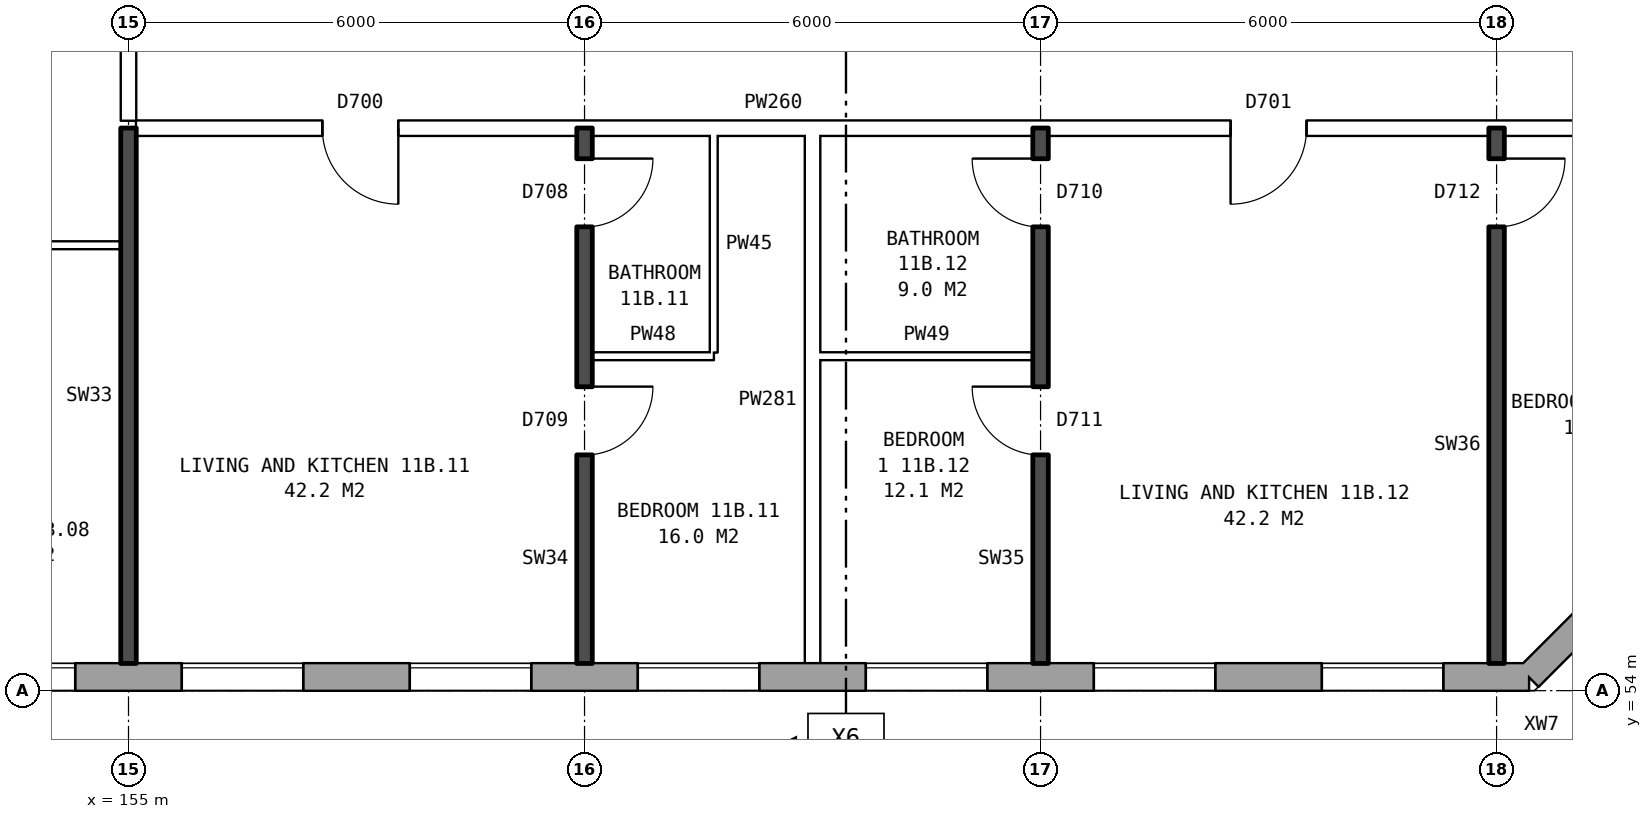
"""IFC4 building model, lengths in metres.
Left out: names, types, materials, properties, quantities, classifications, styles, units other than length and angle.
Written with IfcOpenShell. Run it as: python <this file> out.ifc"""

import sys

from ifc_helpers import new_model, si_unit, direction, frame, frame_2d, origin, place, context, subcontext, project, spatial, rectangle, extrude, element, fill, save


model = new_model("IFC4")
c1 = context("Model", 3, precision=1e-05, world=origin(), true_north=direction((0.0, 1.0)))
c2 = subcontext(c1, "Body", "Model", "MODEL_VIEW")
j1 = project(units=[si_unit("LENGTHUNIT", "METRE"), si_unit("PLANEANGLEUNIT", "RADIAN")], contexts=[c1])
p1 = place(None, origin())
s1 = spatial("IfcSite", under=j1, at=p1, CompositionType="ELEMENT")
p2 = place(p1, origin())
s2 = spatial("IfcBuilding", under=s1, at=p2, CompositionType="ELEMENT")
p3 = place(p2, frame((0.0, 0.0, 44.3)))
s3 = spatial("IfcBuildingStorey", under=s2, at=p3, CompositionType="ELEMENT", Elevation=44.3)
p4 = place(p3, frame((134.075, 54.18, 0.0), z_axis=(0.0, 0.0, 1.0), x_axis=(1.0, 0.0, 0.0)))
e1 = element("IfcWall", 1, at=p4, inside=s3, PredefinedType="STANDARD", context=c2, shape_type="SweptSolid", body=[
    extrude(rectangle(XDim=39.351, YDim=0.36, at=frame_2d((19.675, 0.0))), origin(), (0.0, 0.0, 1.0), 2.85),
])
p5 = place(p4, frame((0.3, 0.0, 0.8)))
e2 = element("IfcOpeningElement", 2, at=p5, cuts=e1, PredefinedType="OPENING", context=c2, shape_type="SweptSolid", body=[
    extrude(rectangle(XDim=0.6, YDim=0.9, at=frame_2d((0.3, 0.45))), frame((0.0, 0.19, 0.0), z_axis=(0.0, -1.0, 0.0), x_axis=(1.0, 0.0, 0.0)), (0.0, 0.0, 1.0), 0.38),
])
p6 = place(p4, frame((3.625, 0.0, 0.8)))
e3 = element("IfcOpeningElement", 3, at=p6, cuts=e1, PredefinedType="OPENING", context=c2, shape_type="SweptSolid", body=[
    extrude(rectangle(XDim=1.6, YDim=1.8, at=frame_2d((0.8, 0.9))), frame((0.0, 0.19, 0.0), z_axis=(0.0, -1.0, 0.0), x_axis=(1.0, 0.0, 0.0)), (0.0, 0.0, 1.0), 0.38),
])
p7 = place(p4, frame((6.625, 0.0, 0.8)))
e4 = element("IfcOpeningElement", 4, at=p7, cuts=e1, PredefinedType="OPENING", context=c2, shape_type="SweptSolid", body=[
    extrude(rectangle(XDim=1.6, YDim=1.8, at=frame_2d((0.8, 0.9))), frame((0.0, 0.19, 0.0), z_axis=(0.0, -1.0, 0.0), x_axis=(1.0, 0.0, 0.0)), (0.0, 0.0, 1.0), 0.38),
])
p8 = place(p4, frame((9.625, 0.0, 0.8)))
e5 = element("IfcOpeningElement", 5, at=p8, cuts=e1, PredefinedType="OPENING", context=c2, shape_type="SweptSolid", body=[
    extrude(rectangle(XDim=1.6, YDim=1.8, at=frame_2d((0.8, 0.9))), frame((0.0, 0.19, 0.0), z_axis=(0.0, -1.0, 0.0), x_axis=(1.0, 0.0, 0.0)), (0.0, 0.0, 1.0), 0.38),
])
p9 = place(p4, frame((12.625, 0.0, 0.8)))
e6 = element("IfcOpeningElement", 6, at=p9, cuts=e1, PredefinedType="OPENING", context=c2, shape_type="SweptSolid", body=[
    extrude(rectangle(XDim=1.6, YDim=1.8, at=frame_2d((0.8, 0.9))), frame((0.0, 0.19, 0.0), z_axis=(0.0, -1.0, 0.0), x_axis=(1.0, 0.0, 0.0)), (0.0, 0.0, 1.0), 0.38),
])
p10 = place(p4, frame((15.625, 0.0, 0.8)))
e7 = element("IfcOpeningElement", 7, at=p10, cuts=e1, PredefinedType="OPENING", context=c2, shape_type="SweptSolid", body=[
    extrude(rectangle(XDim=1.6, YDim=1.8, at=frame_2d((0.8, 0.9))), frame((0.0, 0.19, 0.0), z_axis=(0.0, -1.0, 0.0), x_axis=(1.0, 0.0, 0.0)), (0.0, 0.0, 1.0), 0.38),
])
p11 = place(p4, frame((18.625, 0.0, 0.8)))
e8 = element("IfcOpeningElement", 8, at=p11, cuts=e1, PredefinedType="OPENING", context=c2, shape_type="SweptSolid", body=[
    extrude(rectangle(XDim=1.6, YDim=1.8, at=frame_2d((0.8, 0.9))), frame((0.0, 0.19, 0.0), z_axis=(0.0, -1.0, 0.0), x_axis=(1.0, 0.0, 0.0)), (0.0, 0.0, 1.0), 0.38),
])
p12 = place(p4, frame((21.625, 0.0, 0.8)))
e9 = element("IfcOpeningElement", 9, at=p12, cuts=e1, PredefinedType="OPENING", context=c2, shape_type="SweptSolid", body=[
    extrude(rectangle(XDim=1.6, YDim=1.8, at=frame_2d((0.8, 0.9))), frame((0.0, 0.19, 0.0), z_axis=(0.0, -1.0, 0.0), x_axis=(1.0, 0.0, 0.0)), (0.0, 0.0, 1.0), 0.38),
])
p13 = place(p4, frame((24.625, 0.0, 0.8)))
e10 = element("IfcOpeningElement", 10, at=p13, cuts=e1, PredefinedType="OPENING", context=c2, shape_type="SweptSolid", body=[
    extrude(rectangle(XDim=1.6, YDim=1.8, at=frame_2d((0.8, 0.9))), frame((0.0, 0.19, 0.0), z_axis=(0.0, -1.0, 0.0), x_axis=(1.0, 0.0, 0.0)), (0.0, 0.0, 1.0), 0.38),
])
p14 = place(p4, frame((27.625, 0.0, 0.8)))
e11 = element("IfcOpeningElement", 11, at=p14, cuts=e1, PredefinedType="OPENING", context=c2, shape_type="SweptSolid", body=[
    extrude(rectangle(XDim=1.6, YDim=1.8, at=frame_2d((0.8, 0.9))), frame((0.0, 0.19, 0.0), z_axis=(0.0, -1.0, 0.0), x_axis=(1.0, 0.0, 0.0)), (0.0, 0.0, 1.0), 0.38),
])
p15 = place(p4, frame((30.625, 0.0, 0.8)))
e12 = element("IfcOpeningElement", 12, at=p15, cuts=e1, PredefinedType="OPENING", context=c2, shape_type="SweptSolid", body=[
    extrude(rectangle(XDim=1.6, YDim=1.8, at=frame_2d((0.8, 0.9))), frame((0.0, 0.19, 0.0), z_axis=(0.0, -1.0, 0.0), x_axis=(1.0, 0.0, 0.0)), (0.0, 0.0, 1.0), 0.38),
])
p16 = place(p4, frame((33.625, 0.0, 0.8)))
e13 = element("IfcOpeningElement", 13, at=p16, cuts=e1, PredefinedType="OPENING", context=c2, shape_type="SweptSolid", body=[
    extrude(rectangle(XDim=1.6, YDim=1.8, at=frame_2d((0.8, 0.9))), frame((0.0, 0.19, 0.0), z_axis=(0.0, -1.0, 0.0), x_axis=(1.0, 0.0, 0.0)), (0.0, 0.0, 1.0), 0.38),
])
p17 = place(p4, frame((36.625, 0.0, 0.8)))
e14 = element("IfcOpeningElement", 14, at=p17, cuts=e1, PredefinedType="OPENING", context=c2, shape_type="SweptSolid", body=[
    extrude(rectangle(XDim=1.6, YDim=1.8, at=frame_2d((0.8, 0.9))), frame((0.0, 0.19, 0.0), z_axis=(0.0, -1.0, 0.0), x_axis=(1.0, 0.0, 0.0)), (0.0, 0.0, 1.0), 0.38),
])
p18 = place(p4, frame((1.25, 0.0, 0.8)))
e15 = element("IfcOpeningElement", 15, at=p18, cuts=e1, PredefinedType="OPENING", context=c2, shape_type="SweptSolid", body=[
    extrude(rectangle(XDim=1.4, YDim=1.8, at=frame_2d((0.7, 0.9))), frame((0.0, 0.19, 0.0), z_axis=(0.0, -1.0, 0.0), x_axis=(1.0, 0.0, 0.0)), (0.0, 0.0, 1.0), 0.38),
])
p19 = place(p3, frame((173.425, 54.18, 0.0), z_axis=(0.0, 0.0, 1.0), x_axis=(0.707106781187, 0.707106781187, 0.0)))
e16 = element("IfcWall", 16, at=p19, inside=s3, PredefinedType="STANDARD", context=c2, shape_type="SweptSolid", body=[
    extrude(rectangle(XDim=4.094, YDim=0.36, at=frame_2d((2.047, 0.0))), origin(), (0.0, 0.0, 1.0), 2.85),
])
p20 = place(p19, frame((1.247, 0.0, 0.8)))
e17 = element("IfcOpeningElement", 17, at=p20, cuts=e16, PredefinedType="OPENING", context=c2, shape_type="SweptSolid", body=[
    extrude(rectangle(XDim=1.6, YDim=1.8, at=frame_2d((0.8, 0.9))), frame((0.0, 0.19, 0.0), z_axis=(0.0, -1.0, 0.0), x_axis=(1.0, 0.0, 0.0)), (0.0, 0.0, 1.0), 0.38),
])
p21 = place(p3, frame((161.1, 58.4, 0.0), z_axis=(0.0, 0.0, 1.0), x_axis=(1.0, 0.0, 0.0)))
e18 = element("IfcWall", 18, at=p21, inside=s3, PredefinedType="PARTITIONING", context=c2, shape_type="SweptSolid", body=[
    extrude(rectangle(XDim=1.6, YDim=0.1, at=frame_2d((0.8, 0.0))), origin(), (0.0, 0.0, 1.0), 2.85),
])
p22 = place(p3, frame((164.1, 58.4, 0.0), z_axis=(0.0, 0.0, 1.0), x_axis=(1.0, 0.0, 0.0)))
e19 = element("IfcWall", 19, at=p22, inside=s3, PredefinedType="PARTITIONING", context=c2, shape_type="SweptSolid", body=[
    extrude(rectangle(XDim=2.8, YDim=0.1, at=frame_2d((1.4, 0.0))), origin(), (0.0, 0.0, 1.0), 2.85),
])
p23 = place(p3, frame((152.0, 59.86, 0.0), z_axis=(0.0, 0.0, 1.0), x_axis=(1.0, 0.0, 0.0)))
e20 = element("IfcWall", 20, at=p23, inside=s3, PredefinedType="PARTITIONING", context=c2, shape_type="SweptSolid", body=[
    extrude(rectangle(XDim=2.9, YDim=0.1, at=frame_2d((1.45, 0.0))), origin(), (0.0, 0.0, 1.0), 2.85),
])
p24 = place(p23, frame((1.0, 0.0, 0.0)))
e21 = element("IfcOpeningElement", 21, at=p24, cuts=e20, PredefinedType="OPENING", context=c2, shape_type="SweptSolid", body=[
    extrude(rectangle(XDim=0.9, YDim=2.1, at=frame_2d((0.45, 1.05))), frame((0.0, 0.06, 0.0), z_axis=(0.0, -1.0, 0.0), x_axis=(1.0, 0.0, 0.0)), (0.0, 0.0, 1.0), 0.12),
])
p25 = place(p3, frame((155.1, 61.4, 0.0), z_axis=(0.0, 0.0, 1.0), x_axis=(1.0, 0.0, 0.0)))
e22 = element("IfcWall", 22, at=p25, inside=s3, PredefinedType="PARTITIONING", context=c2, shape_type="SweptSolid", body=[
    extrude(rectangle(XDim=21.04, YDim=0.2, at=frame_2d((10.52, 0.0))), origin(), (0.0, 0.0, 1.0), 2.85),
])
p26 = place(p25, frame((2.45, 0.0, 0.0)))
e23 = element("IfcOpeningElement", 23, at=p26, cuts=e22, PredefinedType="OPENING", context=c2, shape_type="SweptSolid", body=[
    extrude(rectangle(XDim=1.0, YDim=2.1, at=frame_2d((0.5, 1.05))), frame((0.0, 0.11, 0.0), z_axis=(0.0, -1.0, 0.0), x_axis=(1.0, 0.0, 0.0)), (0.0, 0.0, 1.0), 0.22),
])
p27 = place(p25, frame((14.4, 0.0, 0.0)))
e24 = element("IfcOpeningElement", 24, at=p27, cuts=e22, PredefinedType="OPENING", context=c2, shape_type="SweptSolid", body=[
    extrude(rectangle(XDim=1.0, YDim=2.1, at=frame_2d((0.5, 1.05))), frame((0.0, 0.11, 0.0), z_axis=(0.0, -1.0, 0.0), x_axis=(1.0, 0.0, 0.0)), (0.0, 0.0, 1.0), 0.22),
])
p28 = place(p3, frame((155.0, 54.36, 0.0), z_axis=(0.0, 0.0, 1.0), x_axis=(0.0, 1.0, 0.0)))
e25 = element("IfcWall", 25, at=p28, inside=s3, PredefinedType="SOLIDWALL", context=c2, shape_type="SweptSolid", body=[
    extrude(rectangle(XDim=7.04, YDim=0.2, at=frame_2d((3.52, 0.0))), origin(), (0.0, 0.0, 1.0), 2.85),
])
p29 = place(p3, frame((155.0, 61.5, 0.0), z_axis=(0.0, 0.0, 1.0), x_axis=(0.0, 1.0, 0.0)))
e26 = element("IfcWall", 26, at=p29, inside=s3, PredefinedType="PARTITIONING", context=c2, shape_type="SweptSolid", body=[
    extrude(rectangle(XDim=2.2, YDim=0.2, at=frame_2d((1.1, 0.0))), origin(), (0.0, 0.0, 1.0), 2.85),
])
p30 = place(p3, frame((161.0, 54.36, 0.0), z_axis=(0.0, 0.0, 1.0), x_axis=(0.0, 1.0, 0.0)))
e27 = element("IfcWall", 27, at=p30, inside=s3, PredefinedType="SOLIDWALL", context=c2, shape_type="SweptSolid", body=[
    extrude(rectangle(XDim=7.04, YDim=0.2, at=frame_2d((3.52, 0.0))), origin(), (0.0, 0.0, 1.0), 2.85),
])
p31 = place(p30, frame((2.74, 0.0, 0.0)))
e28 = element("IfcOpeningElement", 28, at=p31, cuts=e27, PredefinedType="OPENING", context=c2, shape_type="SweptSolid", body=[
    extrude(rectangle(XDim=0.9, YDim=2.1, at=frame_2d((0.45, 1.05))), frame((0.0, 0.11, 0.0), z_axis=(0.0, -1.0, 0.0), x_axis=(1.0, 0.0, 0.0)), (0.0, 0.0, 1.0), 0.22),
])
p32 = place(p30, frame((5.74, 0.0, 0.0)))
e29 = element("IfcOpeningElement", 29, at=p32, cuts=e27, PredefinedType="OPENING", context=c2, shape_type="SweptSolid", body=[
    extrude(rectangle(XDim=0.9, YDim=2.1, at=frame_2d((0.45, 1.05))), frame((0.0, 0.11, 0.0), z_axis=(0.0, -1.0, 0.0), x_axis=(1.0, 0.0, 0.0)), (0.0, 0.0, 1.0), 0.22),
])
p33 = place(p3, frame((162.7, 58.45, 0.0), z_axis=(0.0, 0.0, 1.0), x_axis=(0.0, 1.0, 0.0)))
e30 = element("IfcWall", 30, at=p33, inside=s3, PredefinedType="PARTITIONING", context=c2, shape_type="SweptSolid", body=[
    extrude(rectangle(XDim=2.85, YDim=0.1, at=frame_2d((1.425, 0.0))), origin(), (0.0, 0.0, 1.0), 2.85),
])
p34 = place(p3, frame((164.0, 54.36, 0.0), z_axis=(0.0, 0.0, 1.0), x_axis=(0.0, 1.0, 0.0)))
e31 = element("IfcWall", 31, at=p34, inside=s3, PredefinedType="PARTITIONING", context=c2, shape_type="SweptSolid", body=[
    extrude(rectangle(XDim=6.94, YDim=0.2, at=frame_2d((3.47, 0.0))), origin(), (0.0, 0.0, 1.0), 2.85),
])
p35 = place(p3, frame((167.0, 54.36, 0.0), z_axis=(0.0, 0.0, 1.0), x_axis=(0.0, 1.0, 0.0)))
e32 = element("IfcWall", 32, at=p35, inside=s3, PredefinedType="SOLIDWALL", context=c2, shape_type="SweptSolid", body=[
    extrude(rectangle(XDim=7.04, YDim=0.2, at=frame_2d((3.52, 0.0))), origin(), (0.0, 0.0, 1.0), 2.85),
])
p36 = place(p35, frame((2.74, 0.0, 0.0)))
e33 = element("IfcOpeningElement", 33, at=p36, cuts=e32, PredefinedType="OPENING", context=c2, shape_type="SweptSolid", body=[
    extrude(rectangle(XDim=0.9, YDim=2.1, at=frame_2d((0.45, 1.05))), frame((0.0, 0.11, 0.0), z_axis=(0.0, -1.0, 0.0), x_axis=(1.0, 0.0, 0.0)), (0.0, 0.0, 1.0), 0.22),
])
p37 = place(p35, frame((5.74, 0.0, 0.0)))
e34 = element("IfcOpeningElement", 34, at=p37, cuts=e32, PredefinedType="OPENING", context=c2, shape_type="SweptSolid", body=[
    extrude(rectangle(XDim=0.9, YDim=2.1, at=frame_2d((0.45, 1.05))), frame((0.0, 0.11, 0.0), z_axis=(0.0, -1.0, 0.0), x_axis=(1.0, 0.0, 0.0)), (0.0, 0.0, 1.0), 0.22),
])
p38 = place(p3, frame((173.0, 54.36, 0.0), z_axis=(0.0, 0.0, 1.0), x_axis=(0.0, 1.0, 0.0)))
e35 = element("IfcWall", 35, at=p38, inside=s3, PredefinedType="SOLIDWALL", context=c2, shape_type="SweptSolid", body=[
    extrude(rectangle(XDim=7.04, YDim=0.2, at=frame_2d((3.52, 0.0))), origin(), (0.0, 0.0, 1.0), 2.85),
])
p39 = place(p38, frame((5.74, 0.0, 0.0)))
e36 = element("IfcOpeningElement", 36, at=p39, cuts=e35, PredefinedType="OPENING", context=c2, shape_type="SweptSolid", body=[
    extrude(rectangle(XDim=0.9, YDim=2.1, at=frame_2d((0.45, 1.05))), frame((0.0, 0.11, 0.0), z_axis=(0.0, -1.0, 0.0), x_axis=(1.0, 0.0, 0.0)), (0.0, 0.0, 1.0), 0.22),
])
p40 = place(p11, origin())
e37 = element("IfcWindow", 37, at=p40, inside=s3, PartitioningType="SINGLE_PANEL", PredefinedType="WINDOW", context=c2, shape_type="SweptSolid", body=[
    extrude(rectangle(XDim=1.6, YDim=1.8, at=frame_2d((0.8, 0.9))), frame((0.0, 0.15, 0.0), z_axis=(0.0, -1.0, 0.0), x_axis=(1.0, 0.0, 0.0)), (0.0, 0.0, 1.0), 0.06),
])
fill(e8, e37)
p41 = place(p12, origin())
e38 = element("IfcWindow", 38, at=p41, inside=s3, PartitioningType="SINGLE_PANEL", PredefinedType="WINDOW", context=c2, shape_type="SweptSolid", body=[
    extrude(rectangle(XDim=1.6, YDim=1.8, at=frame_2d((0.8, 0.9))), frame((0.0, 0.15, 0.0), z_axis=(0.0, -1.0, 0.0), x_axis=(1.0, 0.0, 0.0)), (0.0, 0.0, 1.0), 0.06),
])
fill(e9, e38)
p42 = place(p13, origin())
e39 = element("IfcWindow", 39, at=p42, inside=s3, PartitioningType="SINGLE_PANEL", PredefinedType="WINDOW", context=c2, shape_type="SweptSolid", body=[
    extrude(rectangle(XDim=1.6, YDim=1.8, at=frame_2d((0.8, 0.9))), frame((0.0, 0.15, 0.0), z_axis=(0.0, -1.0, 0.0), x_axis=(1.0, 0.0, 0.0)), (0.0, 0.0, 1.0), 0.06),
])
fill(e10, e39)
p43 = place(p14, origin())
e40 = element("IfcWindow", 40, at=p43, inside=s3, PartitioningType="SINGLE_PANEL", PredefinedType="WINDOW", context=c2, shape_type="SweptSolid", body=[
    extrude(rectangle(XDim=1.6, YDim=1.8, at=frame_2d((0.8, 0.9))), frame((0.0, 0.15, 0.0), z_axis=(0.0, -1.0, 0.0), x_axis=(1.0, 0.0, 0.0)), (0.0, 0.0, 1.0), 0.06),
])
fill(e11, e40)
p44 = place(p15, origin())
e41 = element("IfcWindow", 41, at=p44, inside=s3, PartitioningType="SINGLE_PANEL", PredefinedType="WINDOW", context=c2, shape_type="SweptSolid", body=[
    extrude(rectangle(XDim=1.6, YDim=1.8, at=frame_2d((0.8, 0.9))), frame((0.0, 0.15, 0.0), z_axis=(0.0, -1.0, 0.0), x_axis=(1.0, 0.0, 0.0)), (0.0, 0.0, 1.0), 0.06),
])
fill(e12, e41)
p45 = place(p16, origin())
e42 = element("IfcWindow", 42, at=p45, inside=s3, PartitioningType="SINGLE_PANEL", PredefinedType="WINDOW", context=c2, shape_type="SweptSolid", body=[
    extrude(rectangle(XDim=1.6, YDim=1.8, at=frame_2d((0.8, 0.9))), frame((0.0, 0.15, 0.0), z_axis=(0.0, -1.0, 0.0), x_axis=(1.0, 0.0, 0.0)), (0.0, 0.0, 1.0), 0.06),
])
fill(e13, e42)
p46 = place(p17, origin())
e43 = element("IfcWindow", 43, at=p46, inside=s3, PartitioningType="SINGLE_PANEL", PredefinedType="WINDOW", context=c2, shape_type="SweptSolid", body=[
    extrude(rectangle(XDim=1.6, YDim=1.8, at=frame_2d((0.8, 0.9))), frame((0.0, 0.15, 0.0), z_axis=(0.0, -1.0, 0.0), x_axis=(1.0, 0.0, 0.0)), (0.0, 0.0, 1.0), 0.06),
])
fill(e14, e43)
p47 = place(p31, frame((0.9, 0.0, 0.0), z_axis=(0.0, 0.0, 1.0), x_axis=(-1.0, 0.0, 0.0)))
e44 = element("IfcDoor", 44, at=p47, inside=s3, OperationType="SINGLE_SWING_LEFT", PredefinedType="DOOR", context=c2, shape_type="SweptSolid", body=[
    extrude(rectangle(XDim=0.9, YDim=2.1, at=frame_2d((0.45, 1.05))), frame((0.0, 0.025, 0.0), z_axis=(0.0, -1.0, 0.0), x_axis=(1.0, 0.0, 0.0)), (0.0, 0.0, 1.0), 0.05),
])
fill(e28, e44)
p48 = place(p26, frame((1.0, 0.0, 0.0), z_axis=(0.0, 0.0, 1.0), x_axis=(-1.0, 0.0, 0.0)))
e45 = element("IfcDoor", 45, at=p48, inside=s3, OperationType="SINGLE_SWING_LEFT", PredefinedType="DOOR", context=c2, shape_type="SweptSolid", body=[
    extrude(rectangle(XDim=1.0, YDim=2.1, at=frame_2d((0.5, 1.05))), frame((0.0, 0.025, 0.0), z_axis=(0.0, -1.0, 0.0), x_axis=(1.0, 0.0, 0.0)), (0.0, 0.0, 1.0), 0.05),
])
fill(e23, e45)
p49 = place(p32, frame((0.9, 0.0, 0.0), z_axis=(0.0, 0.0, 1.0), x_axis=(-1.0, 0.0, 0.0)))
e46 = element("IfcDoor", 46, at=p49, inside=s3, OperationType="SINGLE_SWING_LEFT", PredefinedType="DOOR", context=c2, shape_type="SweptSolid", body=[
    extrude(rectangle(XDim=0.9, YDim=2.1, at=frame_2d((0.45, 1.05))), frame((0.0, 0.025, 0.0), z_axis=(0.0, -1.0, 0.0), x_axis=(1.0, 0.0, 0.0)), (0.0, 0.0, 1.0), 0.05),
])
fill(e29, e46)
p50 = place(p36, origin())
e47 = element("IfcDoor", 47, at=p50, inside=s3, OperationType="SINGLE_SWING_RIGHT", PredefinedType="DOOR", context=c2, shape_type="SweptSolid", body=[
    extrude(rectangle(XDim=0.9, YDim=2.1, at=frame_2d((0.45, 1.05))), frame((0.0, 0.025, 0.0), z_axis=(0.0, -1.0, 0.0), x_axis=(1.0, 0.0, 0.0)), (0.0, 0.0, 1.0), 0.05),
])
fill(e33, e47)
p51 = place(p39, frame((0.9, 0.0, 0.0), z_axis=(0.0, 0.0, 1.0), x_axis=(-1.0, 0.0, 0.0)))
e48 = element("IfcDoor", 48, at=p51, inside=s3, OperationType="SINGLE_SWING_LEFT", PredefinedType="DOOR", context=c2, shape_type="SweptSolid", body=[
    extrude(rectangle(XDim=0.9, YDim=2.1, at=frame_2d((0.45, 1.05))), frame((0.0, 0.025, 0.0), z_axis=(0.0, -1.0, 0.0), x_axis=(1.0, 0.0, 0.0)), (0.0, 0.0, 1.0), 0.05),
])
fill(e36, e48)
p52 = place(p27, frame((1.0, 0.0, 0.0), z_axis=(0.0, 0.0, 1.0), x_axis=(-1.0, 0.0, 0.0)))
e49 = element("IfcDoor", 49, at=p52, inside=s3, OperationType="SINGLE_SWING_RIGHT", PredefinedType="DOOR", context=c2, shape_type="SweptSolid", body=[
    extrude(rectangle(XDim=1.0, YDim=2.1, at=frame_2d((0.5, 1.05))), frame((0.0, 0.025, 0.0), z_axis=(0.0, -1.0, 0.0), x_axis=(1.0, 0.0, 0.0)), (0.0, 0.0, 1.0), 0.05),
])
fill(e24, e49)
p53 = place(p37, origin())
e50 = element("IfcDoor", 50, at=p53, inside=s3, OperationType="SINGLE_SWING_RIGHT", PredefinedType="DOOR", context=c2, shape_type="SweptSolid", body=[
    extrude(rectangle(XDim=0.9, YDim=2.1, at=frame_2d((0.45, 1.05))), frame((0.0, 0.025, 0.0), z_axis=(0.0, -1.0, 0.0), x_axis=(1.0, 0.0, 0.0)), (0.0, 0.0, 1.0), 0.05),
])
fill(e34, e50)
save(model, sys.argv[1])
